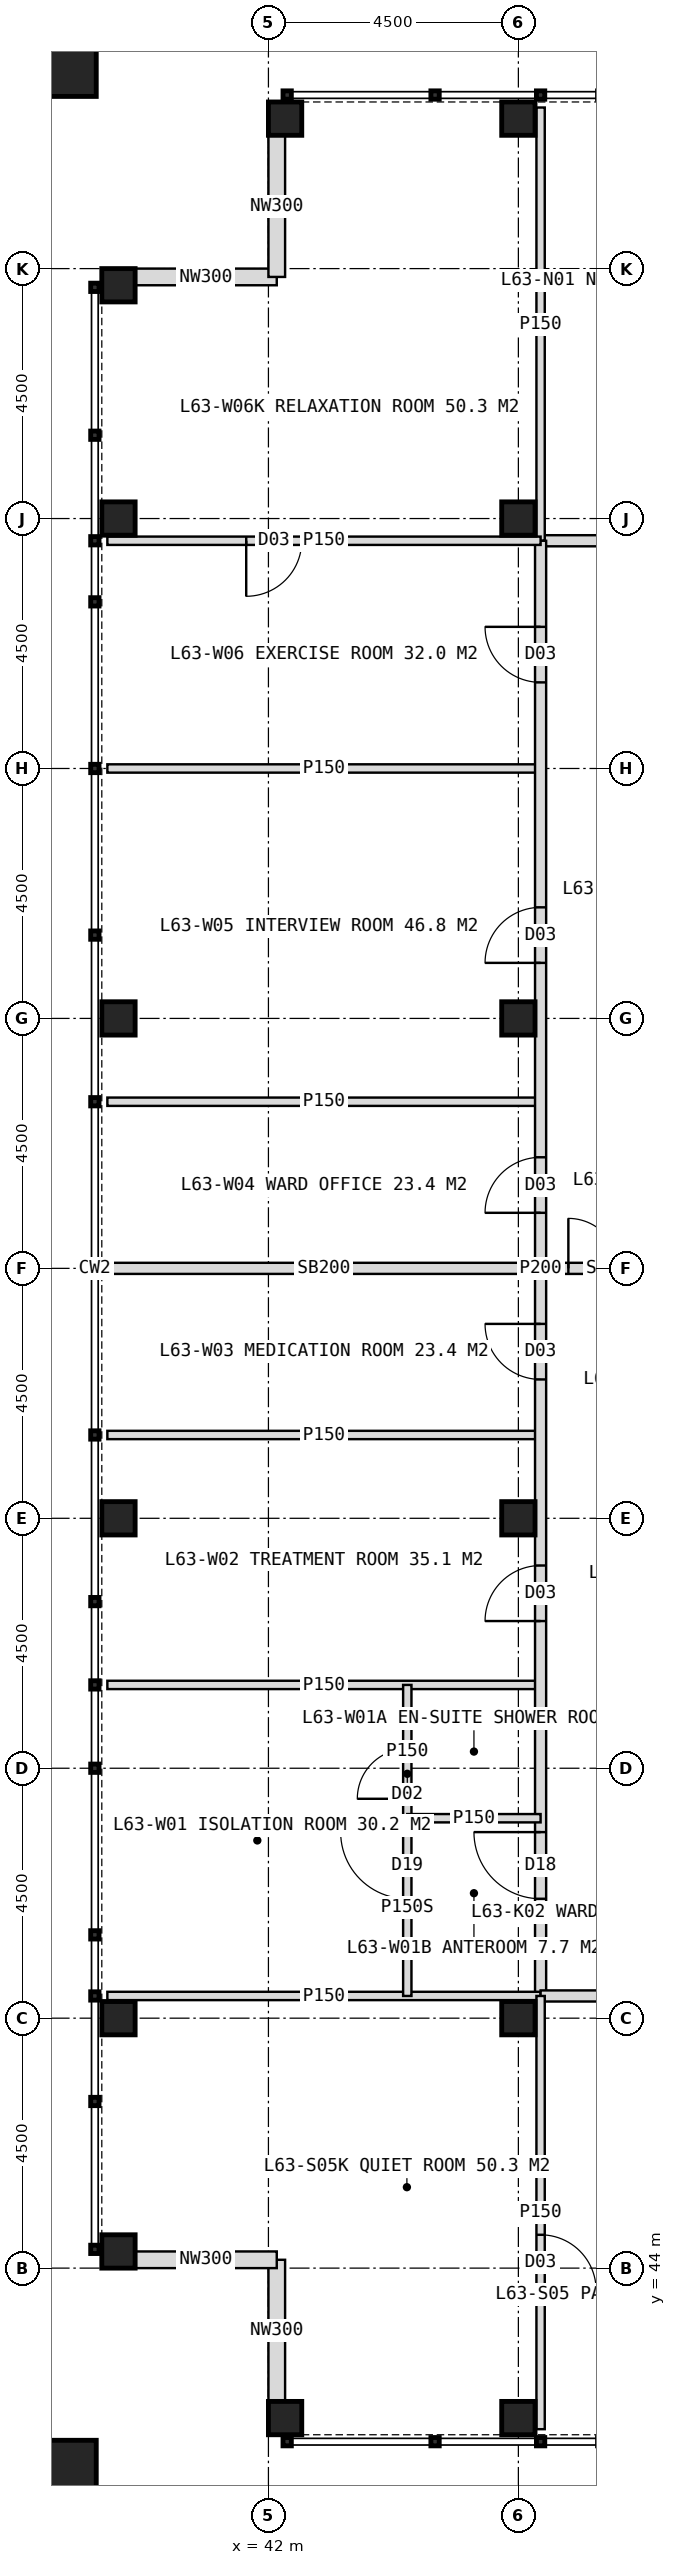
"""IFC4 building model, lengths in metres.
Left out: names, types, materials, properties, quantities, classifications, styles, units other than length and angle.
Written with IfcOpenShell. Run it as: python <this file> out.ifc"""

import sys

from ifc_helpers import new_model, si_unit, direction, frame, frame_2d, origin, origin_2d, place, context, subcontext, project, spatial, rectangle, hollow_rectangle, extrude, element, fill, save


model = new_model("IFC4")
c1 = context("Model", 3, precision=1e-05, world=origin(), true_north=direction((0.0, 1.0)))
c2 = subcontext(c1, "Body", "Model", "MODEL_VIEW")
j1 = project(units=[si_unit("LENGTHUNIT", "METRE"), si_unit("PLANEANGLEUNIT", "RADIAN")], contexts=[c1])
p1 = place(None, origin())
s1 = spatial("IfcSite", under=j1, at=p1, CompositionType="ELEMENT")
p2 = place(p1, origin())
s2 = spatial("IfcBuilding", under=s1, at=p2, CompositionType="ELEMENT")
p3 = place(p2, frame((0.0, 0.0, 262.0)))
s3 = spatial("IfcBuildingStorey", under=s2, at=p3, CompositionType="ELEMENT", Elevation=262.0)
for number, where, z_axis, x_axis in (
    (1, (46.5, 48.5, 0.0), (0.0, 0.0, 1.0), (1.0, 0.0, 0.0)),
    (2, (46.5, 75.5, 0.0), (0.0, 0.0, 1.0), (1.0, 0.0, 0.0)),
    (3, (46.5, 57.5, 0.0), (0.0, 0.0, 1.0), (1.0, 0.0, 0.0)),
    (4, (46.5, 66.5, 0.0), (0.0, 0.0, 1.0), (1.0, 0.0, 0.0)),
    (5, (42.3, 41.3, 0.0), (0.0, 0.0, 1.0), (1.0, 0.0, 0.0)),
    (6, (42.3, 82.7, 0.0), (0.0, 0.0, 1.0), (1.0, 0.0, 0.0)),
    (7, (39.3, 44.3, 0.0), (0.0, 0.0, 1.0), (1.0, 0.0, 0.0)),
    (8, (46.5, 41.3, 0.0), (0.0, 0.0, 1.0), (1.0, 0.0, 0.0)),
    (9, (46.5, 82.7, 0.0), (0.0, 0.0, 1.0), (1.0, 0.0, 0.0)),
    (10, (39.3, 48.5, 0.0), (0.0, 0.0, 1.0), (1.0, 0.0, 0.0)),
    (11, (39.3, 57.5, 0.0), (0.0, 0.0, 1.0), (1.0, 0.0, 0.0)),
    (12, (39.3, 66.5, 0.0), (0.0, 0.0, 1.0), (1.0, 0.0, 0.0)),
    (13, (39.3, 75.5, 0.0), (0.0, 0.0, 1.0), (1.0, 0.0, 0.0)),
    (14, (39.3, 79.7, 0.0), (0.0, 0.0, 1.0), (1.0, 0.0, 0.0)),
):
    element("IfcColumn", number, at=place(p3, frame(where, z_axis=z_axis, x_axis=x_axis)), inside=s3, PredefinedType="COLUMN", context=c2, shape_type="SweptSolid", body=[
        extrude(hollow_rectangle(XDim=0.6, YDim=0.6, WallThickness=0.04, at=origin_2d()), origin(), (0.0, 0.0, 1.0), 4.0),
    ])
for number, where, z_axis, x_axis in (
    (15, (38.4, 40.4, 0.0), (0.0, 0.0, 1.0), (1.0, 0.0, 0.0)),
    (16, (38.4, 83.6, 0.0), (0.0, 0.0, 1.0), (1.0, 0.0, 0.0)),
):
    element("IfcColumn", number, at=place(p3, frame(where, z_axis=z_axis, x_axis=x_axis)), inside=s3, PredefinedType="COLUMN", context=c2, shape_type="SweptSolid", body=[
        extrude(hollow_rectangle(XDim=1.0, YDim=1.0, WallThickness=0.06, at=origin_2d()), origin(), (0.0, 0.0, 1.0), 4.0),
    ])
for number, where, z_axis, x_axis in (
    (17, (39.6, 79.85, 0.0), (0.0, 0.0, 1.0), (1.0, 0.0, 0.0)),
    (18, (42.15, 79.85, 0.0), (0.0, 0.0, 1.0), (0.0, 1.0, 0.0)),
    (19, (42.15, 41.6, 0.0), (0.0, 0.0, 1.0), (0.0, 1.0, 0.0)),
    (20, (42.15, 44.15, 0.0), (0.0, 0.0, 1.0), (-1.0, 0.0, 0.0)),
):
    element("IfcWall", number, at=place(p3, frame(where, z_axis=z_axis, x_axis=x_axis)), inside=s3, PredefinedType="ELEMENTEDWALL", context=c2, shape_type="SweptSolid", body=[
        extrude(rectangle(XDim=2.55, YDim=0.3, at=frame_2d((1.275, 0.0))), origin(), (0.0, 0.0, 1.0), 2.95),
    ])
p4 = place(p3, frame((46.9, 75.1, 0.0), z_axis=(0.0, 0.0, 1.0), x_axis=(1.0, 0.0, 0.0)))
e21 = element("IfcWall", 21, at=p4, inside=s3, PredefinedType="PARTITIONING", context=c2, shape_type="SweptSolid", body=[
    extrude(rectangle(XDim=26.2, YDim=0.2, at=frame_2d((13.1, 0.0))), origin(), (0.0, 0.0, 1.0), 3.75),
])
p5 = place(p4, frame((1.55, 0.0, 0.0)))
e22 = element("IfcOpeningElement", 22, at=p5, cuts=e21, PredefinedType="OPENING", context=c2, shape_type="SweptSolid", body=[
    extrude(rectangle(XDim=1.0, YDim=2.1, at=frame_2d((0.5, 1.05))), frame((0.0, 0.11, 0.0), z_axis=(0.0, -1.0, 0.0), x_axis=(1.0, 0.0, 0.0)), (0.0, 0.0, 1.0), 0.22),
])
p6 = place(p4, frame((6.6, 0.0, 0.0)))
e23 = element("IfcOpeningElement", 23, at=p6, cuts=e21, PredefinedType="OPENING", context=c2, shape_type="SweptSolid", body=[
    extrude(rectangle(XDim=1.0, YDim=2.1, at=frame_2d((0.5, 1.05))), frame((0.0, 0.11, 0.0), z_axis=(0.0, -1.0, 0.0), x_axis=(1.0, 0.0, 0.0)), (0.0, 0.0, 1.0), 0.22),
])
p7 = place(p4, frame((12.75, 0.0, 0.0)))
e24 = element("IfcOpeningElement", 24, at=p7, cuts=e21, PredefinedType="OPENING", context=c2, shape_type="SweptSolid", body=[
    extrude(rectangle(XDim=1.2, YDim=2.2, at=frame_2d((0.6, 1.1))), frame((0.0, 0.11, 0.0), z_axis=(0.0, -1.0, 0.0), x_axis=(1.0, 0.0, 0.0)), (0.0, 0.0, 1.0), 0.22),
])
p8 = place(p4, frame((18.45, 0.0, 0.0)))
e25 = element("IfcOpeningElement", 25, at=p8, cuts=e21, PredefinedType="OPENING", context=c2, shape_type="SweptSolid", body=[
    extrude(rectangle(XDim=1.0, YDim=2.1, at=frame_2d((0.5, 1.05))), frame((0.0, 0.11, 0.0), z_axis=(0.0, -1.0, 0.0), x_axis=(1.0, 0.0, 0.0)), (0.0, 0.0, 1.0), 0.22),
])
p9 = place(p4, frame((22.9, 0.0, 0.0)))
e26 = element("IfcOpeningElement", 26, at=p9, cuts=e21, PredefinedType="OPENING", context=c2, shape_type="SweptSolid", body=[
    extrude(rectangle(XDim=1.0, YDim=2.1, at=frame_2d((0.5, 1.05))), frame((0.0, 0.11, 0.0), z_axis=(0.0, -1.0, 0.0), x_axis=(1.0, 0.0, 0.0)), (0.0, 0.0, 1.0), 0.22),
])
for number, where, z_axis, x_axis in (
    (27, (46.9, 75.1, 0.0), (0.0, 0.0, 1.0), (0.0, 1.0, 0.0)),
    (28, (46.9, 54.5, 0.0), (0.0, 0.0, 1.0), (-1.0, 0.0, 0.0)),
    (29, (46.9, 59.0, 0.0), (0.0, 0.0, 1.0), (-1.0, 0.0, 0.0)),
):
    element("IfcWall", number, at=place(p3, frame(where, z_axis=z_axis, x_axis=x_axis)), inside=s3, PredefinedType="PARTITIONING", context=c2, shape_type="SweptSolid", body=[
        extrude(rectangle(XDim=7.8, YDim=0.15, at=frame_2d((3.9, 0.0))), origin(), (0.0, 0.0, 1.0), 3.75),
    ])
p10 = place(p3, frame((46.9, 62.0, 0.0), z_axis=(0.0, 0.0, 1.0), x_axis=(-1.0, 0.0, 0.0)))
e30 = element("IfcWall", 30, at=p10, inside=s3, PredefinedType="SOLIDWALL", context=c2, shape_type="SweptSolid", body=[
    extrude(rectangle(XDim=7.8, YDim=0.2, at=frame_2d((3.9, 0.0))), origin(), (0.0, 0.0, 1.0), 2.75),
])
for number, where, z_axis, x_axis in (
    (31, (46.9, 65.0, 0.0), (0.0, 0.0, 1.0), (-1.0, 0.0, 0.0)),
    (32, (46.9, 71.0, 0.0), (0.0, 0.0, 1.0), (-1.0, 0.0, 0.0)),
):
    element("IfcWall", number, at=place(p3, frame(where, z_axis=z_axis, x_axis=x_axis)), inside=s3, PredefinedType="PARTITIONING", context=c2, shape_type="SweptSolid", body=[
        extrude(rectangle(XDim=7.8, YDim=0.15, at=frame_2d((3.9, 0.0))), origin(), (0.0, 0.0, 1.0), 3.75),
    ])
p11 = place(p3, frame((46.9, 48.9, 0.0), z_axis=(0.0, 0.0, 1.0), x_axis=(0.0, 1.0, 0.0)))
e33 = element("IfcWall", 33, at=p11, inside=s3, PredefinedType="PARTITIONING", context=c2, shape_type="SweptSolid", body=[
    extrude(rectangle(XDim=26.2, YDim=0.2, at=frame_2d((13.1, 0.0))), origin(), (0.0, 0.0, 1.0), 3.75),
])
p12 = place(p11, frame((1.75, 0.0, 0.0)))
e34 = element("IfcOpeningElement", 34, at=p12, cuts=e33, PredefinedType="OPENING", context=c2, shape_type="SweptSolid", body=[
    extrude(rectangle(XDim=1.2, YDim=2.2, at=frame_2d((0.6, 1.1))), frame((0.0, 0.11, 0.0), z_axis=(0.0, -1.0, 0.0), x_axis=(1.0, 0.0, 0.0)), (0.0, 0.0, 1.0), 0.22),
])
p13 = place(p11, frame((6.75, 0.0, 0.0)))
e35 = element("IfcOpeningElement", 35, at=p13, cuts=e33, PredefinedType="OPENING", context=c2, shape_type="SweptSolid", body=[
    extrude(rectangle(XDim=1.0, YDim=2.1, at=frame_2d((0.5, 1.05))), frame((0.0, 0.11, 0.0), z_axis=(0.0, -1.0, 0.0), x_axis=(1.0, 0.0, 0.0)), (0.0, 0.0, 1.0), 0.22),
])
p14 = place(p11, frame((11.1, 0.0, 0.0)))
e36 = element("IfcOpeningElement", 36, at=p14, cuts=e33, PredefinedType="OPENING", context=c2, shape_type="SweptSolid", body=[
    extrude(rectangle(XDim=1.0, YDim=2.1, at=frame_2d((0.5, 1.05))), frame((0.0, 0.11, 0.0), z_axis=(0.0, -1.0, 0.0), x_axis=(1.0, 0.0, 0.0)), (0.0, 0.0, 1.0), 0.22),
])
p15 = place(p11, frame((14.1, 0.0, 0.0)))
e37 = element("IfcOpeningElement", 37, at=p15, cuts=e33, PredefinedType="OPENING", context=c2, shape_type="SweptSolid", body=[
    extrude(rectangle(XDim=1.0, YDim=2.1, at=frame_2d((0.5, 1.05))), frame((0.0, 0.11, 0.0), z_axis=(0.0, -1.0, 0.0), x_axis=(1.0, 0.0, 0.0)), (0.0, 0.0, 1.0), 0.22),
])
p16 = place(p11, frame((18.6, 0.0, 0.0)))
e38 = element("IfcOpeningElement", 38, at=p16, cuts=e33, PredefinedType="OPENING", context=c2, shape_type="SweptSolid", body=[
    extrude(rectangle(XDim=1.0, YDim=2.1, at=frame_2d((0.5, 1.05))), frame((0.0, 0.11, 0.0), z_axis=(0.0, -1.0, 0.0), x_axis=(1.0, 0.0, 0.0)), (0.0, 0.0, 1.0), 0.22),
])
p17 = place(p11, frame((23.65, 0.0, 0.0)))
e39 = element("IfcOpeningElement", 39, at=p17, cuts=e33, PredefinedType="OPENING", context=c2, shape_type="SweptSolid", body=[
    extrude(rectangle(XDim=1.0, YDim=2.1, at=frame_2d((0.5, 1.05))), frame((0.0, 0.11, 0.0), z_axis=(0.0, -1.0, 0.0), x_axis=(1.0, 0.0, 0.0)), (0.0, 0.0, 1.0), 0.22),
])
p18 = place(p3, frame((46.9, 48.9, 0.0), z_axis=(0.0, 0.0, 1.0), x_axis=(-1.0, 0.0, 0.0)))
e40 = element("IfcWall", 40, at=p18, inside=s3, PredefinedType="PARTITIONING", context=c2, shape_type="SweptSolid", body=[
    extrude(rectangle(XDim=7.8, YDim=0.15, at=frame_2d((3.9, 0.0))), origin(), (0.0, 0.0, 1.0), 3.75),
])
p19 = place(p3, frame((44.5, 52.1, 0.0), z_axis=(0.0, 0.0, 1.0), x_axis=(0.0, 1.0, 0.0)))
e41 = element("IfcWall", 41, at=p19, inside=s3, PredefinedType="PARTITIONING", context=c2, shape_type="SweptSolid", body=[
    extrude(rectangle(XDim=2.4, YDim=0.15, at=frame_2d((1.2, 0.0))), origin(), (0.0, 0.0, 1.0), 3.75),
])
p20 = place(p19, frame((0.35, 0.0, 0.0)))
e42 = element("IfcOpeningElement", 42, at=p20, cuts=e41, PredefinedType="OPENING", context=c2, shape_type="SweptSolid", body=[
    extrude(rectangle(XDim=0.9, YDim=2.1, at=frame_2d((0.45, 1.05))), frame((0.0, 0.085, 0.0), z_axis=(0.0, -1.0, 0.0), x_axis=(1.0, 0.0, 0.0)), (0.0, 0.0, 1.0), 0.17),
])
p21 = place(p3, frame((46.9, 52.1, 0.0), z_axis=(0.0, 0.0, 1.0), x_axis=(-1.0, 0.0, 0.0)))
e43 = element("IfcWall", 43, at=p21, inside=s3, PredefinedType="PARTITIONING", context=c2, shape_type="SweptSolid", body=[
    extrude(rectangle(XDim=2.4, YDim=0.15, at=frame_2d((1.2, 0.0))), origin(), (0.0, 0.0, 1.0), 3.75),
])
p22 = place(p3, frame((44.5, 48.9, 0.0), z_axis=(0.0, 0.0, 1.0), x_axis=(0.0, 1.0, 0.0)))
e44 = element("IfcWall", 44, at=p22, inside=s3, PredefinedType="PARTITIONING", context=c2, shape_type="SweptSolid", body=[
    extrude(rectangle(XDim=3.2, YDim=0.15, at=frame_2d((1.6, 0.0))), origin(), (0.0, 0.0, 1.0), 3.75),
])
p23 = place(p22, frame((1.75, 0.0, 0.0)))
e45 = element("IfcOpeningElement", 45, at=p23, cuts=e44, PredefinedType="OPENING", context=c2, shape_type="SweptSolid", body=[
    extrude(rectangle(XDim=1.2, YDim=2.2, at=frame_2d((0.6, 1.1))), frame((0.0, 0.085, 0.0), z_axis=(0.0, -1.0, 0.0), x_axis=(1.0, 0.0, 0.0)), (0.0, 0.0, 1.0), 0.17),
])
p24 = place(p3, frame((46.9, 75.1, 0.0), z_axis=(0.0, 0.0, 1.0), x_axis=(-1.0, 0.0, 0.0)))
e46 = element("IfcWall", 46, at=p24, inside=s3, PredefinedType="PARTITIONING", context=c2, shape_type="SweptSolid", body=[
    extrude(rectangle(XDim=7.8, YDim=0.15, at=frame_2d((3.9, 0.0))), origin(), (0.0, 0.0, 1.0), 3.75),
])
p25 = place(p24, frame((4.3, 0.0, 0.0)))
e47 = element("IfcOpeningElement", 47, at=p25, cuts=e46, PredefinedType="OPENING", context=c2, shape_type="SweptSolid", body=[
    extrude(rectangle(XDim=1.0, YDim=2.1, at=frame_2d((0.5, 1.05))), frame((0.0, 0.085, 0.0), z_axis=(0.0, -1.0, 0.0), x_axis=(1.0, 0.0, 0.0)), (0.0, 0.0, 1.0), 0.17),
])
p26 = place(p3, frame((73.1, 48.9, 0.0), z_axis=(0.0, 0.0, 1.0), x_axis=(-1.0, 0.0, 0.0)))
e48 = element("IfcWall", 48, at=p26, inside=s3, PredefinedType="PARTITIONING", context=c2, shape_type="SweptSolid", body=[
    extrude(rectangle(XDim=26.2, YDim=0.2, at=frame_2d((13.1, 0.0))), origin(), (0.0, 0.0, 1.0), 3.75),
])
p27 = place(p26, frame((1.75, 0.0, 0.0)))
e49 = element("IfcOpeningElement", 49, at=p27, cuts=e48, PredefinedType="OPENING", context=c2, shape_type="SweptSolid", body=[
    extrude(rectangle(XDim=1.2, YDim=2.2, at=frame_2d((0.6, 1.1))), frame((0.0, 0.11, 0.0), z_axis=(0.0, -1.0, 0.0), x_axis=(1.0, 0.0, 0.0)), (0.0, 0.0, 1.0), 0.22),
])
p28 = place(p26, frame((6.75, 0.0, 0.0)))
e50 = element("IfcOpeningElement", 50, at=p28, cuts=e48, PredefinedType="OPENING", context=c2, shape_type="SweptSolid", body=[
    extrude(rectangle(XDim=1.0, YDim=2.1, at=frame_2d((0.5, 1.05))), frame((0.0, 0.11, 0.0), z_axis=(0.0, -1.0, 0.0), x_axis=(1.0, 0.0, 0.0)), (0.0, 0.0, 1.0), 0.22),
])
p29 = place(p26, frame((14.25, 0.0, 0.0)))
e51 = element("IfcOpeningElement", 51, at=p29, cuts=e48, PredefinedType="OPENING", context=c2, shape_type="SweptSolid", body=[
    extrude(rectangle(XDim=1.2, YDim=2.2, at=frame_2d((0.6, 1.1))), frame((0.0, 0.11, 0.0), z_axis=(0.0, -1.0, 0.0), x_axis=(1.0, 0.0, 0.0)), (0.0, 0.0, 1.0), 0.22),
])
p30 = place(p26, frame((20.45, 0.0, 0.0)))
e52 = element("IfcOpeningElement", 52, at=p30, cuts=e48, PredefinedType="OPENING", context=c2, shape_type="SweptSolid", body=[
    extrude(rectangle(XDim=0.9, YDim=2.1, at=frame_2d((0.45, 1.05))), frame((0.0, 0.11, 0.0), z_axis=(0.0, -1.0, 0.0), x_axis=(1.0, 0.0, 0.0)), (0.0, 0.0, 1.0), 0.22),
])
p31 = place(p26, frame((18.45, 0.0, 0.0)))
e53 = element("IfcOpeningElement", 53, at=p31, cuts=e48, PredefinedType="OPENING", context=c2, shape_type="SweptSolid", body=[
    extrude(rectangle(XDim=1.0, YDim=2.1, at=frame_2d((0.5, 1.05))), frame((0.0, 0.11, 0.0), z_axis=(0.0, -1.0, 0.0), x_axis=(1.0, 0.0, 0.0)), (0.0, 0.0, 1.0), 0.22),
])
p32 = place(p26, frame((23.65, 0.0, 0.0)))
e54 = element("IfcOpeningElement", 54, at=p32, cuts=e48, PredefinedType="OPENING", context=c2, shape_type="SweptSolid", body=[
    extrude(rectangle(XDim=1.0, YDim=2.1, at=frame_2d((0.5, 1.05))), frame((0.0, 0.11, 0.0), z_axis=(0.0, -1.0, 0.0), x_axis=(1.0, 0.0, 0.0)), (0.0, 0.0, 1.0), 0.22),
])
p33 = place(p3, frame((46.9, 48.9, 0.0), z_axis=(0.0, 0.0, 1.0), x_axis=(0.0, -1.0, 0.0)))
e55 = element("IfcWall", 55, at=p33, inside=s3, PredefinedType="PARTITIONING", context=c2, shape_type="SweptSolid", body=[
    extrude(rectangle(XDim=7.8, YDim=0.15, at=frame_2d((3.9, 0.0))), origin(), (0.0, 0.0, 1.0), 3.75),
])
p34 = place(p33, frame((4.3, 0.0, 0.0)))
e56 = element("IfcOpeningElement", 56, at=p34, cuts=e55, PredefinedType="OPENING", context=c2, shape_type="SweptSolid", body=[
    extrude(rectangle(XDim=1.0, YDim=2.1, at=frame_2d((0.5, 1.05))), frame((0.0, 0.085, 0.0), z_axis=(0.0, -1.0, 0.0), x_axis=(1.0, 0.0, 0.0)), (0.0, 0.0, 1.0), 0.17),
])
p35 = place(p3, frame((49.5, 62.0, 0.0), z_axis=(0.0, 0.0, 1.0), x_axis=(-1.0, 0.0, 0.0)))
e57 = element("IfcWall", 57, at=p35, inside=s3, PredefinedType="SOLIDWALL", context=c2, shape_type="SweptSolid", body=[
    extrude(rectangle(XDim=2.6, YDim=0.2, at=frame_2d((1.3, 0.0))), origin(), (0.0, 0.0, 1.0), 2.75),
])
p36 = place(p35, frame((0.3, 0.0, 0.0)))
e58 = element("IfcOpeningElement", 58, at=p36, cuts=e57, PredefinedType="OPENING", context=c2, shape_type="SweptSolid", body=[
    extrude(rectangle(XDim=1.8, YDim=2.2, at=frame_2d((0.9, 1.1))), frame((0.0, 0.11, 0.0), z_axis=(0.0, -1.0, 0.0), x_axis=(1.0, 0.0, 0.0)), (0.0, 0.0, 1.0), 0.22),
])
p37 = place(p23, origin())
e59 = element("IfcDoor", 59, at=p37, inside=s3, OperationType="SINGLE_SWING_RIGHT", PredefinedType="DOOR", context=c2, shape_type="SweptSolid", body=[
    extrude(rectangle(XDim=1.2, YDim=2.2, at=frame_2d((0.6, 1.1))), frame((0.0, 0.025, 0.0), z_axis=(0.0, -1.0, 0.0), x_axis=(1.0, 0.0, 0.0)), (0.0, 0.0, 1.0), 0.05),
])
fill(e45, e59)
p38 = place(p12, origin())
e60 = element("IfcDoor", 60, at=p38, inside=s3, OperationType="SINGLE_SWING_RIGHT", PredefinedType="DOOR", context=c2, shape_type="SweptSolid", body=[
    extrude(rectangle(XDim=1.2, YDim=2.2, at=frame_2d((0.6, 1.1))), frame((0.0, 0.025, 0.0), z_axis=(0.0, -1.0, 0.0), x_axis=(1.0, 0.0, 0.0)), (0.0, 0.0, 1.0), 0.05),
])
fill(e34, e60)
p39 = place(p20, origin())
e61 = element("IfcDoor", 61, at=p39, inside=s3, OperationType="SINGLE_SWING_LEFT", PredefinedType="DOOR", context=c2, shape_type="SweptSolid", body=[
    extrude(rectangle(XDim=0.9, YDim=2.1, at=frame_2d((0.45, 1.05))), frame((0.0, 0.025, 0.0), z_axis=(0.0, -1.0, 0.0), x_axis=(1.0, 0.0, 0.0)), (0.0, 0.0, 1.0), 0.05),
])
fill(e42, e61)
p40 = place(p13, origin())
e62 = element("IfcDoor", 62, at=p40, inside=s3, OperationType="SINGLE_SWING_LEFT", PredefinedType="DOOR", context=c2, shape_type="SweptSolid", body=[
    extrude(rectangle(XDim=1.0, YDim=2.1, at=frame_2d((0.5, 1.05))), frame((0.0, 0.025, 0.0), z_axis=(0.0, -1.0, 0.0), x_axis=(1.0, 0.0, 0.0)), (0.0, 0.0, 1.0), 0.05),
])
fill(e35, e62)
p41 = place(p14, origin())
e63 = element("IfcDoor", 63, at=p41, inside=s3, OperationType="SINGLE_SWING_RIGHT", PredefinedType="DOOR", context=c2, shape_type="SweptSolid", body=[
    extrude(rectangle(XDim=1.0, YDim=2.1, at=frame_2d((0.5, 1.05))), frame((0.0, 0.025, 0.0), z_axis=(0.0, -1.0, 0.0), x_axis=(1.0, 0.0, 0.0)), (0.0, 0.0, 1.0), 0.05),
])
fill(e36, e63)
p42 = place(p15, origin())
e64 = element("IfcDoor", 64, at=p42, inside=s3, OperationType="SINGLE_SWING_LEFT", PredefinedType="DOOR", context=c2, shape_type="SweptSolid", body=[
    extrude(rectangle(XDim=1.0, YDim=2.1, at=frame_2d((0.5, 1.05))), frame((0.0, 0.025, 0.0), z_axis=(0.0, -1.0, 0.0), x_axis=(1.0, 0.0, 0.0)), (0.0, 0.0, 1.0), 0.05),
])
fill(e37, e64)
p43 = place(p16, origin())
e65 = element("IfcDoor", 65, at=p43, inside=s3, OperationType="SINGLE_SWING_LEFT", PredefinedType="DOOR", context=c2, shape_type="SweptSolid", body=[
    extrude(rectangle(XDim=1.0, YDim=2.1, at=frame_2d((0.5, 1.05))), frame((0.0, 0.025, 0.0), z_axis=(0.0, -1.0, 0.0), x_axis=(1.0, 0.0, 0.0)), (0.0, 0.0, 1.0), 0.05),
])
fill(e38, e65)
p44 = place(p25, origin())
e66 = element("IfcDoor", 66, at=p44, inside=s3, OperationType="SINGLE_SWING_RIGHT", PredefinedType="DOOR", context=c2, shape_type="SweptSolid", body=[
    extrude(rectangle(XDim=1.0, YDim=2.1, at=frame_2d((0.5, 1.05))), frame((0.0, 0.025, 0.0), z_axis=(0.0, -1.0, 0.0), x_axis=(1.0, 0.0, 0.0)), (0.0, 0.0, 1.0), 0.05),
])
fill(e47, e66)
p45 = place(p17, origin())
e67 = element("IfcDoor", 67, at=p45, inside=s3, OperationType="SINGLE_SWING_RIGHT", PredefinedType="DOOR", context=c2, shape_type="SweptSolid", body=[
    extrude(rectangle(XDim=1.0, YDim=2.1, at=frame_2d((0.5, 1.05))), frame((0.0, 0.025, 0.0), z_axis=(0.0, -1.0, 0.0), x_axis=(1.0, 0.0, 0.0)), (0.0, 0.0, 1.0), 0.05),
])
fill(e39, e67)
p46 = place(p34, origin())
e68 = element("IfcDoor", 68, at=p46, inside=s3, OperationType="SINGLE_SWING_RIGHT", PredefinedType="DOOR", context=c2, shape_type="SweptSolid", body=[
    extrude(rectangle(XDim=1.0, YDim=2.1, at=frame_2d((0.5, 1.05))), frame((0.0, 0.025, 0.0), z_axis=(0.0, -1.0, 0.0), x_axis=(1.0, 0.0, 0.0)), (0.0, 0.0, 1.0), 0.05),
])
fill(e56, e68)
p47 = place(p36, origin())
e69 = element("IfcDoor", 69, at=p47, inside=s3, OperationType="DOUBLE_DOOR_DOUBLE_SWING", PredefinedType="DOOR", context=c2, shape_type="SweptSolid", body=[
    extrude(rectangle(XDim=1.8, YDim=2.2, at=frame_2d((0.9, 1.1))), frame((0.0, 0.025, 0.0), z_axis=(0.0, -1.0, 0.0), x_axis=(1.0, 0.0, 0.0)), (0.0, 0.0, 1.0), 0.05),
])
fill(e58, e69)
save(model, sys.argv[1])
